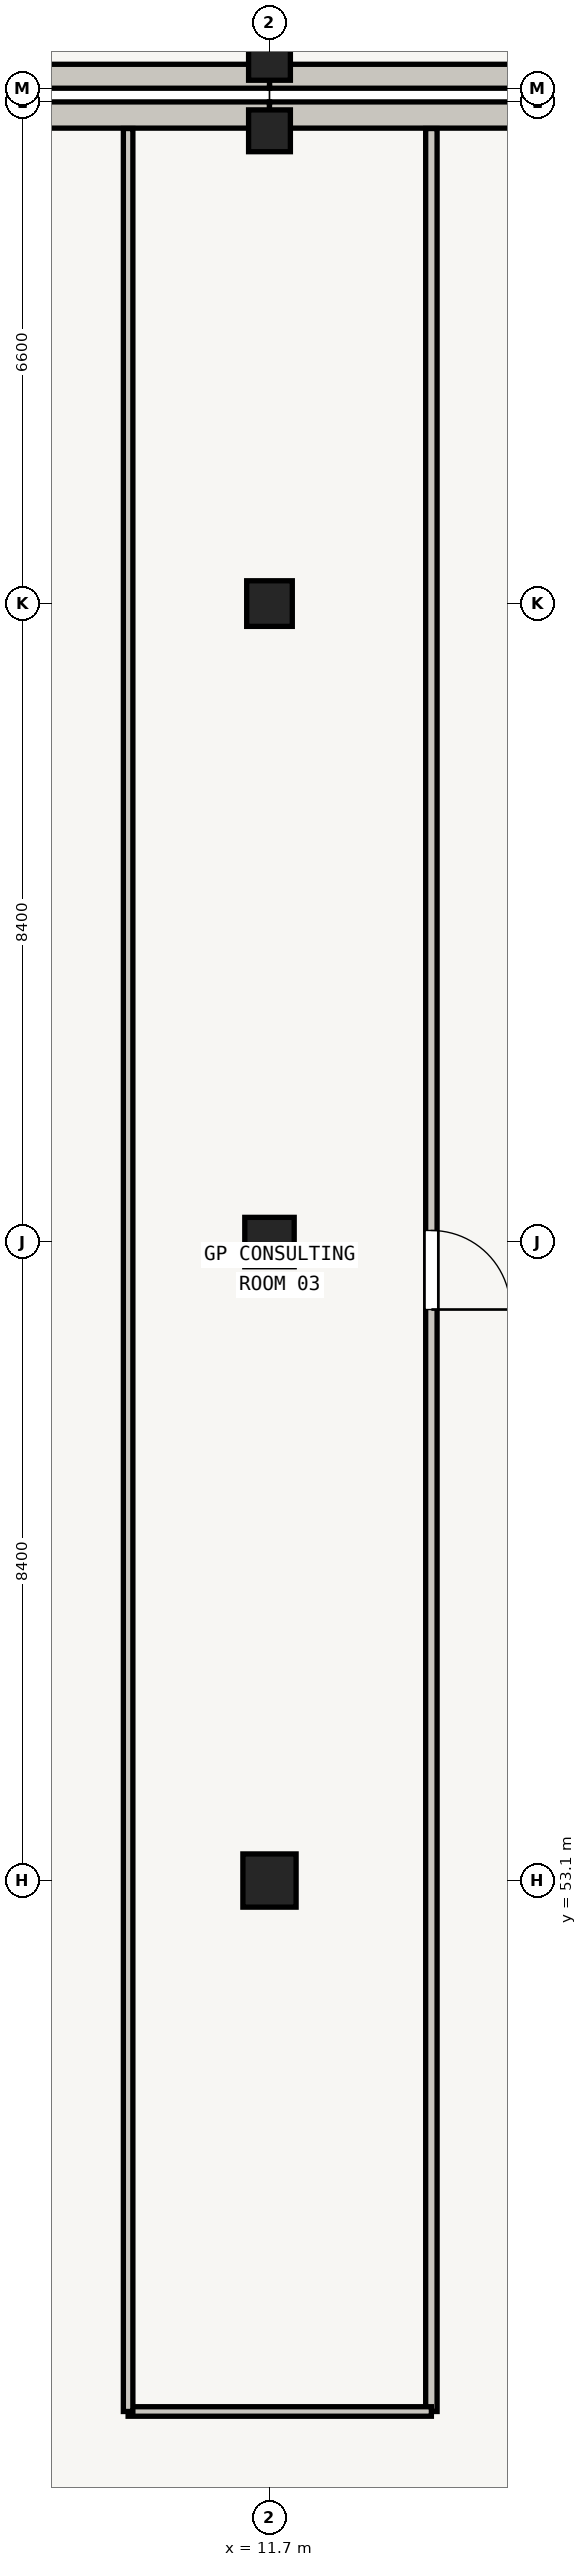
"""IFC4 building model, lengths in metres.
Left out: names, types, materials, properties, quantities, classifications, styles, units other than length and angle.
Written with IfcOpenShell. Run it as: python <this file> out.ifc"""

import sys

from ifc_helpers import new_model, si_unit, direction, frame, frame_2d, origin, origin_2d, place, context, subcontext, project, spatial, rectangle, extrude, element, fill, save


model = new_model("IFC4")
c1 = context("Model", 3, precision=1e-05, world=origin(), true_north=direction((0.0, 1.0)))
c2 = subcontext(c1, "Body", "Model", "MODEL_VIEW")
j1 = project(units=[si_unit("LENGTHUNIT", "METRE"), si_unit("PLANEANGLEUNIT", "RADIAN")], contexts=[c1])
p1 = place(None, origin())
s1 = spatial("IfcSite", under=j1, at=p1, CompositionType="ELEMENT")
p2 = place(p1, origin())
s2 = spatial("IfcBuilding", under=s1, at=p2, CompositionType="ELEMENT")
p3 = place(p2, origin())
s3 = spatial("IfcBuildingStorey", under=s2, at=p3, CompositionType="ELEMENT", Elevation=0.0)
p4 = place(p3, frame((11.7, 53.1, 0.0), z_axis=(0.0, 0.0, 1.0), x_axis=(1.0, 0.0, 0.0)))
e1 = element("IfcColumn", 1, at=p4, inside=s3, PredefinedType="COLUMN", context=c2, shape_type="SweptSolid", body=[
    extrude(rectangle(XDim=0.7, YDim=0.7, at=origin_2d()), origin(), (0.0, 0.0, 1.0), 4.22),
])
p5 = place(p3, frame((11.7, 61.5, 0.0), z_axis=(0.0, 0.0, 1.0), x_axis=(1.0, 0.0, 0.0)))
e2 = element("IfcColumn", 2, at=p5, inside=s3, PredefinedType="COLUMN", context=c2, shape_type="SweptSolid", body=[
    extrude(rectangle(XDim=0.65, YDim=0.65, at=origin_2d()), origin(), (0.0, 0.0, 1.0), 4.22),
])
p6 = place(p3, frame((11.7, 69.9, 0.0), z_axis=(0.0, 0.0, 1.0), x_axis=(1.0, 0.0, 0.0)))
e3 = element("IfcColumn", 3, at=p6, inside=s3, PredefinedType="COLUMN", context=c2, shape_type="SweptSolid", body=[
    extrude(rectangle(XDim=0.6, YDim=0.6, at=origin_2d()), origin(), (0.0, 0.0, 1.0), 4.22),
])
p7 = place(p3, frame((11.7, 76.12, 0.0), z_axis=(0.0, 0.0, 1.0), x_axis=(1.0, 0.0, 0.0)))
e4 = element("IfcColumn", 4, at=p7, inside=s3, PredefinedType="COLUMN", context=c2, shape_type="SweptSolid", body=[
    extrude(rectangle(XDim=0.55, YDim=0.55, at=origin_2d()), origin(), (0.0, 0.0, 1.0), 4.22),
])
p8 = place(p3, frame((11.7, 77.06, 0.0), z_axis=(0.0, 0.0, 1.0), x_axis=(1.0, 0.0, 0.0)))
e5 = element("IfcColumn", 5, at=p8, inside=s3, PredefinedType="COLUMN", context=c2, shape_type="SweptSolid", body=[
    extrude(rectangle(XDim=0.55, YDim=0.55, at=origin_2d()), origin(), (0.0, 0.0, 1.0), 4.235),
])
for number, where, z_axis, x_axis in (
    (6, (4.5, 76.327, 0.0), (0.0, 0.0, 1.0), (1.0, 0.0, 0.0)),
    (7, (11.7, 76.327, 0.0), (0.0, 0.0, 1.0), (1.0, 0.0, 0.0)),
):
    element("IfcWall", number, at=place(p3, frame(where, z_axis=z_axis, x_axis=x_axis)), inside=s3, PredefinedType="SOLIDWALL", context=c2, shape_type="SweptSolid", body=[
        extrude(rectangle(XDim=7.2, YDim=0.345, at=frame_2d((3.6, 0.0))), origin(), (0.0, 0.0, 1.0), 3.625),
    ])
for number, where, z_axis, x_axis in (
    (8, (18.9, 76.837, 0.0), (0.0, 0.0, 1.0), (-1.0, 0.0, 0.0)),
    (9, (11.7, 76.837, 0.0), (0.0, 0.0, 1.0), (-1.0, 0.0, 0.0)),
):
    element("IfcWall", number, at=place(p3, frame(where, z_axis=z_axis, x_axis=x_axis)), inside=s3, PredefinedType="SOLIDWALL", context=c2, shape_type="SweptSolid", body=[
        extrude(rectangle(XDim=7.2, YDim=0.315, at=frame_2d((3.6, 0.0))), origin(), (0.0, 0.0, 1.0), 3.6),
    ])
p9 = place(p3, frame((13.83, 76.15, 0.0), z_axis=(0.0, 0.0, 1.0), x_axis=(0.0, -1.0, 0.0)))
e10 = element("IfcWall", 10, at=p9, inside=s3, PredefinedType="PARTITIONING", context=c2, shape_type="SweptSolid", body=[
    extrude(rectangle(XDim=30.035, YDim=0.15, at=frame_2d((15.018, 0.0))), origin(), (0.0, 0.0, 1.0), 3.24),
])
p10 = place(p9, frame((14.498, 0.0, 0.0)))
e11 = element("IfcOpeningElement", 11, at=p10, cuts=e10, PredefinedType="OPENING", context=c2, shape_type="SweptSolid", body=[
    extrude(rectangle(XDim=1.04, YDim=2.05, at=frame_2d((0.52, 1.025))), frame((0.0, 0.075, 0.0), z_axis=(0.0, -1.0, 0.0), x_axis=(1.0, 0.0, 0.0)), (0.0, 0.0, 1.0), 0.15),
])
p11 = place(p3, frame((13.83, 46.115, 0.0), z_axis=(0.0, 0.0, 1.0), x_axis=(-1.0, 0.0, 0.0)))
e12 = element("IfcWall", 12, at=p11, inside=s3, PredefinedType="PARTITIONING", context=c2, shape_type="SweptSolid", body=[
    extrude(rectangle(XDim=3.99, YDim=0.125, at=frame_2d((1.995, 0.0))), origin(), (0.0, 0.0, 1.0), 3.24),
])
p12 = place(p3, frame((9.84, 46.115, 0.0), z_axis=(0.0, 0.0, 1.0), x_axis=(0.0, 1.0, 0.0)))
e13 = element("IfcWall", 13, at=p12, inside=s3, PredefinedType="PARTITIONING", context=c2, shape_type="SweptSolid", body=[
    extrude(rectangle(XDim=30.035, YDim=0.125, at=frame_2d((15.018, 0.0))), origin(), (0.0, 0.0, 1.0), 3.24),
])
p13 = place(p10, origin())
e14 = element("IfcDoor", 14, at=p13, inside=s3, OperationType="SINGLE_SWING_RIGHT", PredefinedType="DOOR", context=c2, shape_type="SweptSolid", body=[
    extrude(rectangle(XDim=1.04, YDim=2.05, at=frame_2d((0.52, 1.025))), frame((0.0, 0.025, 0.0), z_axis=(0.0, -1.0, 0.0), x_axis=(1.0, 0.0, 0.0)), (0.0, 0.0, 1.0), 0.05),
])
fill(e11, e14)
save(model, sys.argv[1])
